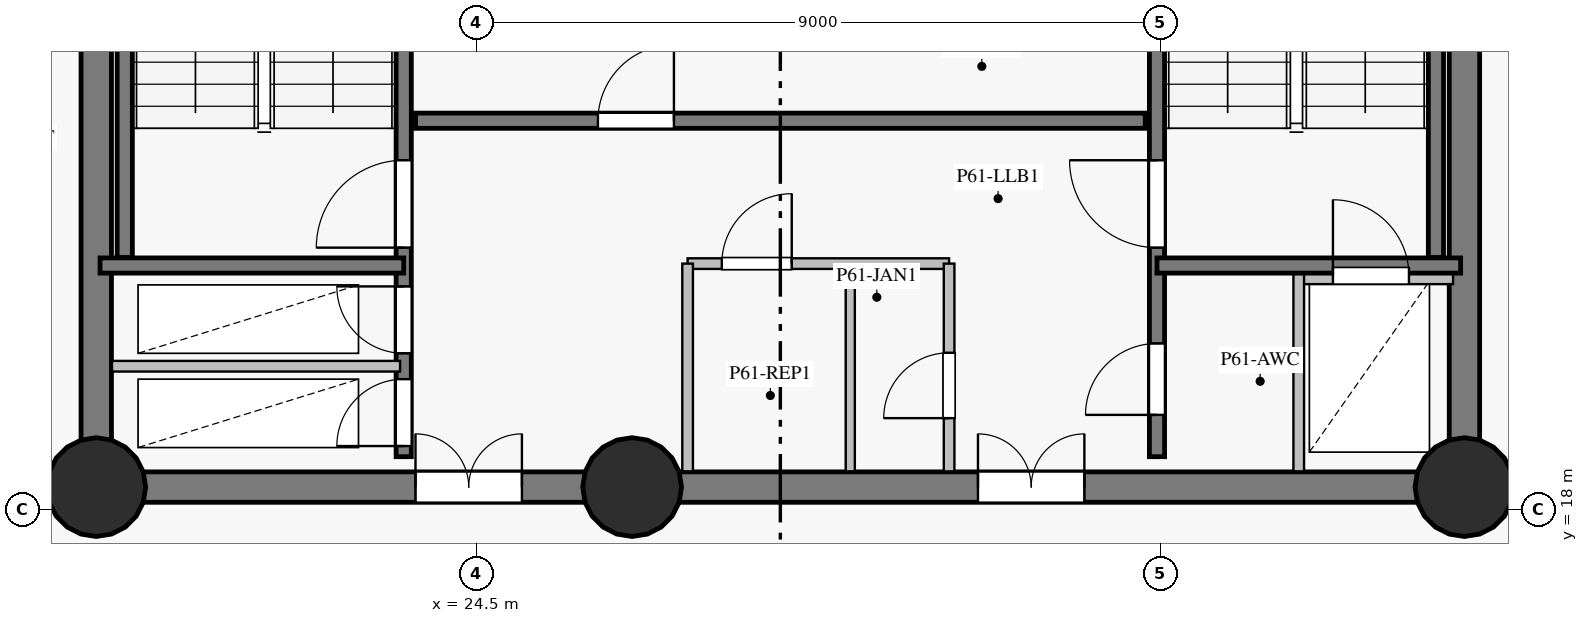
"""IFC4 building model, lengths in metres.
Left out: names, types, materials, properties, quantities, classifications, styles, units other than length and angle.
Written with IfcOpenShell. Run it as: python <this file> out.ifc"""

import sys

from ifc_helpers import new_model, si_unit, direction, frame, frame_2d, origin, origin_with_axes, origin_2d, place, context, subcontext, project, spatial, rectangle, circle, extrude, source, transform, mapped, element, fill, save


model = new_model("IFC4")
c1 = context("Model", 3, precision=1e-05, world=origin(), true_north=direction((0.0, 1.0)))
c2 = subcontext(c1, "Body", "Model", "MODEL_VIEW")
j1 = project(units=[si_unit("LENGTHUNIT", "METRE"), si_unit("PLANEANGLEUNIT", "RADIAN")], contexts=[c1])
p1 = place(None, origin())
s1 = spatial("IfcSite", under=j1, at=p1, CompositionType="ELEMENT")
p2 = place(p1, origin())
s2 = spatial("IfcBuilding", under=s1, at=p2, CompositionType="ELEMENT")
p3 = place(p2, frame((0.0, 0.0, 208.4)))
s3 = spatial("IfcBuildingStorey", under=s2, at=p3, CompositionType="ELEMENT", Elevation=208.4)
p4 = place(p3, frame((19.5, 18.3, 0.0), z_axis=(0.0, 0.0, 1.0), x_axis=(1.0, 0.0, 0.0)))
e1 = element("IfcWall", 1, at=p4, inside=s3, PredefinedType="SHEAR", context=c2, shape_type="SweptSolid", body=[
    extrude(rectangle(XDim=7.05, YDim=0.4, at=frame_2d((3.525, 0.0))), origin(), (0.0, 0.0, 1.0), 4.3),
])
p5 = place(p4, frame((4.2, 0.0, 0.0)))
e2 = element("IfcOpeningElement", 2, at=p5, cuts=e1, PredefinedType="OPENING", context=c2, shape_type="SweptSolid", body=[
    extrude(rectangle(XDim=1.4, YDim=2.2, at=frame_2d((0.7, 1.1))), frame((0.0, 0.21, 0.0), z_axis=(0.0, -1.0, 0.0), x_axis=(1.0, 0.0, 0.0)), (0.0, 0.0, 1.0), 0.42),
])
p6 = place(p3, frame((26.55, 18.3, 0.0), z_axis=(0.0, 0.0, 1.0), x_axis=(1.0, 0.0, 0.0)))
e3 = element("IfcWall", 3, at=p6, inside=s3, PredefinedType="SHEAR", context=c2, shape_type="SweptSolid", body=[
    extrude(rectangle(XDim=10.95, YDim=0.4, at=frame_2d((5.475, 0.0))), origin(), (0.0, 0.0, 1.0), 4.3),
])
p7 = place(p6, frame((4.55, 0.0, 0.0)))
e4 = element("IfcOpeningElement", 4, at=p7, cuts=e3, PredefinedType="OPENING", context=c2, shape_type="SweptSolid", body=[
    extrude(rectangle(XDim=1.4, YDim=2.2, at=frame_2d((0.7, 1.1))), frame((0.0, 0.21, 0.0), z_axis=(0.0, -1.0, 0.0), x_axis=(1.0, 0.0, 0.0)), (0.0, 0.0, 1.0), 0.42),
])
p8 = place(p3, frame((37.5, 18.3, 0.0), z_axis=(0.0, 0.0, 1.0), x_axis=(0.0, 1.0, 0.0)))
e5 = element("IfcWall", 5, at=p8, inside=s3, PredefinedType="SHEAR", context=c2, shape_type="SweptSolid", body=[
    extrude(rectangle(XDim=16.4, YDim=0.4, at=frame_2d((8.2, 0.0))), origin(), (0.0, 0.0, 1.0), 4.3),
])
p9 = place(p8, frame((14.15, 0.0, 0.0)))
e6 = element("IfcOpeningElement", 6, at=p9, cuts=e5, PredefinedType="OPENING", context=c2, shape_type="SweptSolid", body=[
    extrude(rectangle(XDim=1.2, YDim=2.15, at=frame_2d((0.6, 1.075))), frame((0.0, 0.21, 0.0), z_axis=(0.0, -1.0, 0.0), x_axis=(1.0, 0.0, 0.0)), (0.0, 0.0, 1.0), 0.42),
])
p10 = place(p3, frame((19.5, 34.7, 0.0), z_axis=(0.0, 0.0, 1.0), x_axis=(0.0, -1.0, 0.0)))
e7 = element("IfcWall", 7, at=p10, inside=s3, PredefinedType="SHEAR", context=c2, shape_type="SweptSolid", body=[
    extrude(rectangle(XDim=16.4, YDim=0.4, at=frame_2d((8.2, 0.0))), origin(), (0.0, 0.0, 1.0), 4.3),
])
p11 = place(p10, frame((3.1, 0.0, 0.0)))
e8 = element("IfcOpeningElement", 8, at=p11, cuts=e7, PredefinedType="OPENING", context=c2, shape_type="SweptSolid", body=[
    extrude(rectangle(XDim=1.1, YDim=2.15, at=frame_2d((0.55, 1.075))), frame((0.0, 0.21, 0.0), z_axis=(0.0, -1.0, 0.0), x_axis=(1.0, 0.0, 0.0)), (0.0, 0.0, 1.0), 0.42),
])
m1 = source(origin_with_axes(), c2, "Body", "SweptSolid", [
    extrude(circle(Radius=0.65, at=origin_2d()), origin(), (0.0, 0.0, 1.0), 4.5),
])
for number, where, z_axis, x_axis in (
    (9, (19.5, 18.3, 0.0), (0.0, 0.0, 1.0), (1.0, 0.0, 0.0)),
    (10, (26.55, 18.3, 0.0), (0.0, 0.0, 1.0), (1.0, 0.0, 0.0)),
    (11, (37.5, 18.3, 0.0), (0.0, 0.0, 1.0), (1.0, 0.0, 0.0)),
):
    element("IfcColumn", number, at=place(p3, frame(where, z_axis=z_axis, x_axis=x_axis)), inside=s3, PredefinedType="COLUMN", context=c2, shape_type="MappedRepresentation", body=[
        mapped(m1, transform((0.0, 0.0, 0.0), scale=1.0)),
    ])
p12 = place(p3, frame((35.32, 21.08, 0.0), z_axis=(0.0, 0.0, 1.0), x_axis=(1.0, 0.0, 0.0)))
e12 = element("IfcWall", 12, at=p12, inside=s3, PredefinedType="SHEAR", context=c2, shape_type="SweptSolid", body=[
    extrude(rectangle(XDim=2.03, YDim=0.22, at=frame_2d((1.015, 0.0))), origin(), (0.0, 0.0, 1.0), 2.45),
])
p13 = place(p12, frame((0.45, 0.0, 0.0)))
e13 = element("IfcOpeningElement", 13, at=p13, cuts=e12, PredefinedType="OPENING", context=c2, shape_type="SweptSolid", body=[
    extrude(rectangle(XDim=1.0, YDim=2.05, at=frame_2d((0.5, 1.025))), frame((0.0, 0.12, 0.0), z_axis=(0.0, -1.0, 0.0), x_axis=(1.0, 0.0, 0.0)), (0.0, 0.0, 1.0), 0.24),
])
p14 = place(p3, frame((23.545, 18.7, 0.0), z_axis=(0.0, 0.0, 1.0), x_axis=(0.0, 1.0, 0.0)))
e14 = element("IfcWall", 14, at=p14, inside=s3, PredefinedType="SHEAR", context=c2, shape_type="SweptSolid", body=[
    extrude(rectangle(XDim=15.6, YDim=0.2, at=frame_2d((7.8, 0.0))), origin(), (0.0, 0.0, 1.0), 4.3),
])
p15 = place(p14, frame((2.75, 0.0, 0.0)))
e15 = element("IfcOpeningElement", 15, at=p15, cuts=e14, PredefinedType="OPENING", context=c2, shape_type="SweptSolid", body=[
    extrude(rectangle(XDim=1.15, YDim=2.15, at=frame_2d((0.575, 1.075))), frame((0.0, 0.11, 0.0), z_axis=(0.0, -1.0, 0.0), x_axis=(1.0, 0.0, 0.0)), (0.0, 0.0, 1.0), 0.22),
])
p16 = place(p14, frame((0.14, 0.0, 0.0)))
e16 = element("IfcOpeningElement", 16, at=p16, cuts=e14, PredefinedType="OPENING", context=c2, shape_type="SweptSolid", body=[
    extrude(rectangle(XDim=0.88, YDim=2.1, at=frame_2d((0.44, 1.05))), frame((0.0, 0.11, 0.0), z_axis=(0.0, -1.0, 0.0), x_axis=(1.0, 0.0, 0.0)), (0.0, 0.0, 1.0), 0.22),
])
p17 = place(p14, frame((1.36, 0.0, 0.0)))
e17 = element("IfcOpeningElement", 17, at=p17, cuts=e14, PredefinedType="OPENING", context=c2, shape_type="SweptSolid", body=[
    extrude(rectangle(XDim=0.88, YDim=2.1, at=frame_2d((0.44, 1.05))), frame((0.0, 0.11, 0.0), z_axis=(0.0, -1.0, 0.0), x_axis=(1.0, 0.0, 0.0)), (0.0, 0.0, 1.0), 0.22),
])
p18 = place(p14, frame((12.1, 0.0, 0.0)))
e18 = element("IfcOpeningElement", 18, at=p18, cuts=e14, PredefinedType="OPENING", context=c2, shape_type="SweptSolid", body=[
    extrude(rectangle(XDim=1.12, YDim=2.15, at=frame_2d((0.56, 1.075))), frame((0.0, 0.11, 0.0), z_axis=(0.0, -1.0, 0.0), x_axis=(1.0, 0.0, 0.0)), (0.0, 0.0, 1.0), 0.22),
])
p19 = place(p14, frame((14.05, 0.0, 0.0)))
e19 = element("IfcOpeningElement", 19, at=p19, cuts=e14, PredefinedType="OPENING", context=c2, shape_type="SweptSolid", body=[
    extrude(rectangle(XDim=1.12, YDim=2.15, at=frame_2d((0.56, 1.075))), frame((0.0, 0.11, 0.0), z_axis=(0.0, -1.0, 0.0), x_axis=(1.0, 0.0, 0.0)), (0.0, 0.0, 1.0), 0.22),
])
p20 = place(p3, frame((33.455, 18.7, 0.0), z_axis=(0.0, 0.0, 1.0), x_axis=(0.0, 1.0, 0.0)))
e20 = element("IfcWall", 20, at=p20, inside=s3, PredefinedType="SHEAR", context=c2, shape_type="SweptSolid", body=[
    extrude(rectangle(XDim=15.6, YDim=0.2, at=frame_2d((7.8, 0.0))), origin(), (0.0, 0.0, 1.0), 4.3),
])
p21 = place(p20, frame((2.75, 0.0, 0.0)))
e21 = element("IfcOpeningElement", 21, at=p21, cuts=e20, PredefinedType="OPENING", context=c2, shape_type="SweptSolid", body=[
    extrude(rectangle(XDim=1.15, YDim=2.15, at=frame_2d((0.575, 1.075))), frame((0.0, 0.11, 0.0), z_axis=(0.0, -1.0, 0.0), x_axis=(1.0, 0.0, 0.0)), (0.0, 0.0, 1.0), 0.22),
])
p22 = place(p20, frame((0.55, 0.0, 0.0)))
e22 = element("IfcOpeningElement", 22, at=p22, cuts=e20, PredefinedType="OPENING", context=c2, shape_type="SweptSolid", body=[
    extrude(rectangle(XDim=0.94, YDim=2.1, at=frame_2d((0.47, 1.05))), frame((0.0, 0.11, 0.0), z_axis=(0.0, -1.0, 0.0), x_axis=(1.0, 0.0, 0.0)), (0.0, 0.0, 1.0), 0.22),
])
p23 = place(p3, frame((23.7, 23.12, 0.0), z_axis=(0.0, 0.0, 1.0), x_axis=(1.0, 0.0, 0.0)))
e23 = element("IfcWall", 23, at=p23, inside=s3, PredefinedType="SHEAR", context=c2, shape_type="SweptSolid", body=[
    extrude(rectangle(XDim=9.6, YDim=0.2, at=frame_2d((4.8, 0.0))), origin(), (0.0, 0.0, 1.0), 4.3),
])
p24 = place(p23, frame((2.4, 0.0, 0.0)))
e24 = element("IfcOpeningElement", 24, at=p24, cuts=e23, PredefinedType="OPENING", context=c2, shape_type="SweptSolid", body=[
    extrude(rectangle(XDim=1.0, YDim=2.15, at=frame_2d((0.5, 1.075))), frame((0.0, 0.11, 0.0), z_axis=(0.0, -1.0, 0.0), x_axis=(1.0, 0.0, 0.0)), (0.0, 0.0, 1.0), 0.22),
])
for number, where, z_axis, x_axis in (
    (25, (19.875, 21.32, 0.0), (0.0, 0.0, 1.0), (0.0, 1.0, 0.0)),
    (26, (37.125, 21.32, 0.0), (0.0, 0.0, 1.0), (0.0, 1.0, 0.0)),
):
    element("IfcWall", number, at=place(p3, frame(where, z_axis=z_axis, x_axis=x_axis)), inside=s3, PredefinedType="SHEAR", context=c2, shape_type="SweptSolid", body=[
        extrude(rectangle(XDim=7.5, YDim=0.2, at=frame_2d((3.75, 0.0))), origin(), (0.0, 0.0, 1.0), 4.3),
    ])
for number, where, z_axis, x_axis in (
    (27, (33.455, 21.215, 0.0), (0.0, 0.0, 1.0), (1.0, 0.0, 0.0)),
    (28, (19.55, 21.215, 0.0), (0.0, 0.0, 1.0), (1.0, 0.0, 0.0)),
):
    element("IfcWall", number, at=place(p3, frame(where, z_axis=z_axis, x_axis=x_axis)), inside=s3, PredefinedType="SHEAR", context=c2, shape_type="SweptSolid", body=[
        extrude(rectangle(XDim=3.995, YDim=0.2, at=frame_2d((1.998, 0.0))), origin(), (0.0, 0.0, 1.0), 4.3),
    ])
p25 = place(p3, frame((19.707, 19.89, 0.0), z_axis=(0.0, 0.0, 1.0), x_axis=(1.0, 0.0, 0.0)))
e29 = element("IfcWall", 29, at=p25, inside=s3, PredefinedType="PARTITIONING", context=c2, shape_type="SweptSolid", body=[
    extrude(rectangle(XDim=3.79, YDim=0.14, at=frame_2d((1.895, 0.0))), origin(), (0.0, 0.0, 1.0), 4.3),
])
p26 = place(p3, frame((27.28, 21.24, 0.0), z_axis=(0.0, 0.0, 1.0), x_axis=(1.0, 0.0, 0.0)))
e30 = element("IfcWall", 30, at=p26, inside=s3, PredefinedType="PARTITIONING", context=c2, shape_type="SweptSolid", body=[
    extrude(rectangle(XDim=3.44, YDim=0.14, at=frame_2d((1.72, 0.0))), origin(), (0.0, 0.0, 1.0), 4.3),
])
p27 = place(p26, frame((0.45, 0.0, 0.0)))
e31 = element("IfcOpeningElement", 31, at=p27, cuts=e30, PredefinedType="OPENING", context=c2, shape_type="SweptSolid", body=[
    extrude(rectangle(XDim=0.92, YDim=2.1, at=frame_2d((0.46, 1.05))), frame((0.0, 0.08, 0.0), z_axis=(0.0, -1.0, 0.0), x_axis=(1.0, 0.0, 0.0)), (0.0, 0.0, 1.0), 0.16),
])
p28 = place(p3, frame((27.28, 18.507, 0.0), z_axis=(0.0, 0.0, 1.0), x_axis=(0.0, 1.0, 0.0)))
e32 = element("IfcWall", 32, at=p28, inside=s3, PredefinedType="PARTITIONING", context=c2, shape_type="SweptSolid", body=[
    extrude(rectangle(XDim=2.733, YDim=0.14, at=frame_2d((1.366, 0.0))), origin(), (0.0, 0.0, 1.0), 4.3),
])
p29 = place(p3, frame((30.72, 18.507, 0.0), z_axis=(0.0, 0.0, 1.0), x_axis=(0.0, 1.0, 0.0)))
e33 = element("IfcWall", 33, at=p29, inside=s3, PredefinedType="PARTITIONING", context=c2, shape_type="SweptSolid", body=[
    extrude(rectangle(XDim=2.733, YDim=0.14, at=frame_2d((1.366, 0.0))), origin(), (0.0, 0.0, 1.0), 4.3),
])
p30 = place(p29, frame((0.7, 0.0, 0.0)))
e34 = element("IfcOpeningElement", 34, at=p30, cuts=e33, PredefinedType="OPENING", context=c2, shape_type="SweptSolid", body=[
    extrude(rectangle(XDim=0.86, YDim=2.1, at=frame_2d((0.43, 1.05))), frame((0.0, 0.08, 0.0), z_axis=(0.0, -1.0, 0.0), x_axis=(1.0, 0.0, 0.0)), (0.0, 0.0, 1.0), 0.16),
])
p31 = place(p3, frame((29.42, 18.507, 0.0), z_axis=(0.0, 0.0, 1.0), x_axis=(0.0, 1.0, 0.0)))
e35 = element("IfcWall", 35, at=p31, inside=s3, PredefinedType="PARTITIONING", context=c2, shape_type="SweptSolid", body=[
    extrude(rectangle(XDim=2.662, YDim=0.12, at=frame_2d((1.331, 0.0))), origin(), (0.0, 0.0, 1.0), 4.3),
])
p32 = place(p3, frame((35.32, 18.507, 0.0), z_axis=(0.0, 0.0, 1.0), x_axis=(0.0, 1.0, 0.0)))
e36 = element("IfcWall", 36, at=p32, inside=s3, PredefinedType="PARTITIONING", context=c2, shape_type="SweptSolid", body=[
    extrude(rectangle(XDim=2.592, YDim=0.14, at=frame_2d((1.296, 0.0))), origin(), (0.0, 0.0, 1.0), 4.3),
])
m2 = source(origin_with_axes(), c2, "Body", "SweptSolid", [
    extrude(rectangle(XDim=1.0, YDim=2.05, at=frame_2d((0.5, 1.025))), frame((0.0, 0.025, 0.0), z_axis=(0.0, -1.0, 0.0), x_axis=(1.0, 0.0, 0.0)), (0.0, 0.0, 1.0), 0.05),
])
p33 = place(p13, origin())
e37 = element("IfcDoor", 37, at=p33, inside=s3, OperationType="SINGLE_SWING_LEFT", PredefinedType="TRAPDOOR", context=c2, shape_type="MappedRepresentation", body=[
    mapped(m2, transform((0.0, 0.0, 0.0), scale=1.0)),
])
fill(e13, e37)
m3 = source(origin_with_axes(), c2, "Body", "SweptSolid", [
    extrude(rectangle(XDim=1.15, YDim=2.15, at=frame_2d((0.575, 1.075))), frame((0.0, 0.025, 0.0), z_axis=(0.0, -1.0, 0.0), x_axis=(1.0, 0.0, 0.0)), (0.0, 0.0, 1.0), 0.05),
])
p34 = place(p15, origin())
e38 = element("IfcDoor", 38, at=p34, inside=s3, OperationType="SINGLE_SWING_LEFT", PredefinedType="DOOR", context=c2, shape_type="MappedRepresentation", body=[
    mapped(m3, transform((0.0, 0.0, 0.0), scale=1.0)),
])
fill(e15, e38)
p35 = place(p21, origin())
e39 = element("IfcDoor", 39, at=p35, inside=s3, OperationType="SINGLE_SWING_RIGHT", PredefinedType="DOOR", context=c2, shape_type="MappedRepresentation", body=[
    mapped(m3, transform((0.0, 0.0, 0.0), scale=1.0)),
])
fill(e21, e39)
m4 = source(origin_with_axes(), c2, "Body", "SweptSolid", [
    extrude(rectangle(XDim=0.88, YDim=2.1, at=frame_2d((0.44, 1.05))), frame((0.0, 0.025, 0.0), z_axis=(0.0, -1.0, 0.0), x_axis=(1.0, 0.0, 0.0)), (0.0, 0.0, 1.0), 0.05),
])
p36 = place(p16, origin())
e40 = element("IfcDoor", 40, at=p36, inside=s3, OperationType="SINGLE_SWING_LEFT", PredefinedType="DOOR", context=c2, shape_type="MappedRepresentation", body=[
    mapped(m4, transform((0.0, 0.0, 0.0), scale=1.0)),
])
fill(e16, e40)
p37 = place(p17, origin())
e41 = element("IfcDoor", 41, at=p37, inside=s3, OperationType="SINGLE_SWING_RIGHT", PredefinedType="DOOR", context=c2, shape_type="MappedRepresentation", body=[
    mapped(m4, transform((0.0, 0.0, 0.0), scale=1.0)),
])
fill(e17, e41)
m5 = source(origin_with_axes(), c2, "Body", "SweptSolid", [
    extrude(rectangle(XDim=1.4, YDim=2.2, at=frame_2d((0.7, 1.1))), frame((0.0, 0.025, 0.0), z_axis=(0.0, -1.0, 0.0), x_axis=(1.0, 0.0, 0.0)), (0.0, 0.0, 1.0), 0.05),
])
p38 = place(p5, origin())
e42 = element("IfcDoor", 42, at=p38, inside=s3, OperationType="DOUBLE_DOOR_SINGLE_SWING", PredefinedType="DOOR", context=c2, shape_type="MappedRepresentation", body=[
    mapped(m5, transform((0.0, 0.0, 0.0), scale=1.0)),
])
fill(e2, e42)
p39 = place(p7, origin())
e43 = element("IfcDoor", 43, at=p39, inside=s3, OperationType="DOUBLE_DOOR_SINGLE_SWING", PredefinedType="DOOR", context=c2, shape_type="MappedRepresentation", body=[
    mapped(m5, transform((0.0, 0.0, 0.0), scale=1.0)),
])
fill(e4, e43)
m6 = source(origin_with_axes(), c2, "Body", "SweptSolid", [
    extrude(rectangle(XDim=0.94, YDim=2.1, at=frame_2d((0.47, 1.05))), frame((0.0, 0.025, 0.0), z_axis=(0.0, -1.0, 0.0), x_axis=(1.0, 0.0, 0.0)), (0.0, 0.0, 1.0), 0.05),
])
p40 = place(p22, origin())
e44 = element("IfcDoor", 44, at=p40, inside=s3, OperationType="SINGLE_SWING_LEFT", PredefinedType="DOOR", context=c2, shape_type="MappedRepresentation", body=[
    mapped(m6, transform((0.0, 0.0, 0.0), scale=1.0)),
])
fill(e22, e44)
m7 = source(origin_with_axes(), c2, "Body", "SweptSolid", [
    extrude(rectangle(XDim=0.92, YDim=2.1, at=frame_2d((0.46, 1.05))), frame((0.0, 0.025, 0.0), z_axis=(0.0, -1.0, 0.0), x_axis=(1.0, 0.0, 0.0)), (0.0, 0.0, 1.0), 0.05),
])
p41 = place(p27, origin())
e45 = element("IfcDoor", 45, at=p41, inside=s3, OperationType="SINGLE_SWING_RIGHT", PredefinedType="DOOR", context=c2, shape_type="MappedRepresentation", body=[
    mapped(m7, transform((0.0, 0.0, 0.0), scale=1.0)),
])
fill(e31, e45)
m8 = source(origin_with_axes(), c2, "Body", "SweptSolid", [
    extrude(rectangle(XDim=0.86, YDim=2.1, at=frame_2d((0.43, 1.05))), frame((0.0, 0.025, 0.0), z_axis=(0.0, -1.0, 0.0), x_axis=(1.0, 0.0, 0.0)), (0.0, 0.0, 1.0), 0.05),
])
p42 = place(p30, origin())
e46 = element("IfcDoor", 46, at=p42, inside=s3, OperationType="SINGLE_SWING_LEFT", PredefinedType="DOOR", context=c2, shape_type="MappedRepresentation", body=[
    mapped(m8, transform((0.0, 0.0, 0.0), scale=1.0)),
])
fill(e34, e46)
m9 = source(origin_with_axes(), c2, "Body", "SweptSolid", [
    extrude(rectangle(XDim=1.0, YDim=2.15, at=frame_2d((0.5, 1.075))), frame((0.0, 0.025, 0.0), z_axis=(0.0, -1.0, 0.0), x_axis=(1.0, 0.0, 0.0)), (0.0, 0.0, 1.0), 0.05),
])
p43 = place(p24, origin())
e47 = element("IfcDoor", 47, at=p43, inside=s3, OperationType="SINGLE_SWING_RIGHT", PredefinedType="DOOR", context=c2, shape_type="MappedRepresentation", body=[
    mapped(m9, transform((0.0, 0.0, 0.0), scale=1.0)),
])
fill(e24, e47)
save(model, sys.argv[1])
